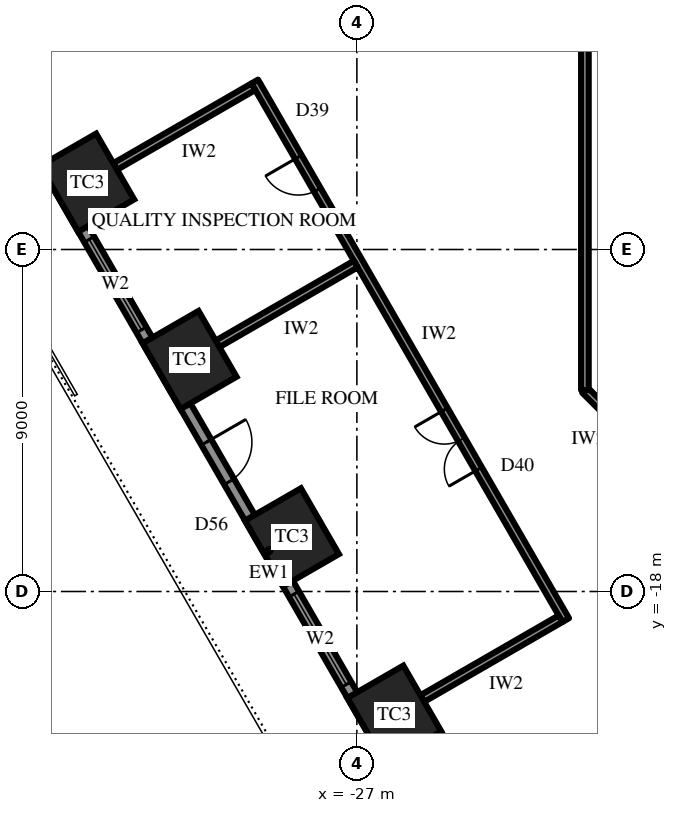
"""IFC4 building model, lengths in metres.
Left out: names, types, materials, properties, quantities, classifications, styles, units other than length and angle.
Written with IfcOpenShell. Run it as: python <this file> out.ifc"""

import sys

from ifc_helpers import new_model, si_unit, direction, frame, frame_2d, origin, origin_2d, place, context, subcontext, project, spatial, rectangle, extrude, element, fill, save


model = new_model("IFC4")
c1 = context("Model", 3, precision=1e-05, world=origin(), true_north=direction((0.0, 1.0)))
c2 = subcontext(c1, "Body", "Model", "MODEL_VIEW")
j1 = project(units=[si_unit("LENGTHUNIT", "METRE"), si_unit("PLANEANGLEUNIT", "RADIAN")], contexts=[c1])
p1 = place(None, origin())
s1 = spatial("IfcSite", under=j1, at=p1, CompositionType="ELEMENT")
p2 = place(p1, origin())
s2 = spatial("IfcBuilding", under=s1, at=p2, CompositionType="ELEMENT")
p3 = place(p2, frame((0.0, 0.0, 65.5)))
s3 = spatial("IfcBuildingStorey", under=s2, at=p3, CompositionType="ELEMENT", Elevation=65.5)
for number, where, z_axis, x_axis in (
    (1, (-34.097, -7.242, 0.0), (0.0, 0.0, 1.0), (0.5, -0.866, 0.0)),
    (2, (-31.403, -11.908, 0.0), (0.0, 0.0, 1.0), (0.5, -0.866, 0.0)),
    (3, (-28.709, -16.575, 0.0), (0.0, 0.0, 1.0), (0.5, -0.866, 0.0)),
    (4, (-26.014, -21.242, 0.0), (0.0, 0.0, 1.0), (0.5, -0.866, 0.0)),
):
    element("IfcColumn", number, at=place(p3, frame(where, z_axis=z_axis, x_axis=x_axis)), inside=s3, PredefinedType="COLUMN", context=c2, shape_type="SweptSolid", body=[
        extrude(rectangle(XDim=2.0, YDim=1.7, at=origin_2d()), origin(), (0.0, 0.0, 1.0), 4.2),
    ])
p4 = place(p3, frame((-37.398, -2.925, 0.0), z_axis=(0.0, 0.0, 1.0), x_axis=(0.499999163675, -0.866025886636, 0.0)))
e5 = element("IfcWall", 5, at=p4, inside=s3, PredefinedType="SOLIDWALL", context=c2, shape_type="SweptSolid", body=[
    extrude(rectangle(XDim=32.332, YDim=0.3, at=frame_2d((16.166, 0.0))), origin(), (0.0, 0.0, 1.0), 2.7),
])
p5 = place(p4, frame((1.319, 0.0, 0.6)))
e6 = element("IfcOpeningElement", 6, at=p5, cuts=e5, PredefinedType="OPENING", context=c2, shape_type="SweptSolid", body=[
    extrude(rectangle(XDim=2.75, YDim=1.85, at=frame_2d((1.375, 0.925))), frame((0.0, 0.16, 0.0), z_axis=(0.0, -1.0, 0.0), x_axis=(1.0, 0.0, 0.0)), (0.0, 0.0, 1.0), 0.32),
])
p6 = place(p4, frame((6.708, 0.0, 0.6)))
e7 = element("IfcOpeningElement", 7, at=p6, cuts=e5, PredefinedType="OPENING", context=c2, shape_type="SweptSolid", body=[
    extrude(rectangle(XDim=2.75, YDim=1.85, at=frame_2d((1.375, 0.925))), frame((0.0, 0.16, 0.0), z_axis=(0.0, -1.0, 0.0), x_axis=(1.0, 0.0, 0.0)), (0.0, 0.0, 1.0), 0.32),
])
p7 = place(p4, frame((12.872, 0.0, 0.0)))
e8 = element("IfcOpeningElement", 8, at=p7, cuts=e5, PredefinedType="OPENING", context=c2, shape_type="SweptSolid", body=[
    extrude(rectangle(XDim=1.2, YDim=2.4, at=frame_2d((0.6, 1.2))), frame((0.0, 0.16, 0.0), z_axis=(0.0, -1.0, 0.0), x_axis=(1.0, 0.0, 0.0)), (0.0, 0.0, 1.0), 0.32),
])
p8 = place(p4, frame((17.485, 0.0, 0.6)))
e9 = element("IfcOpeningElement", 9, at=p8, cuts=e5, PredefinedType="OPENING", context=c2, shape_type="SweptSolid", body=[
    extrude(rectangle(XDim=2.75, YDim=1.85, at=frame_2d((1.375, 0.925))), frame((0.0, 0.16, 0.0), z_axis=(0.0, -1.0, 0.0), x_axis=(1.0, 0.0, 0.0)), (0.0, 0.0, 1.0), 0.32),
])
p9 = place(p4, frame((22.874, 0.0, 0.6)))
e10 = element("IfcOpeningElement", 10, at=p9, cuts=e5, PredefinedType="OPENING", context=c2, shape_type="SweptSolid", body=[
    extrude(rectangle(XDim=2.75, YDim=1.85, at=frame_2d((1.375, 0.925))), frame((0.0, 0.16, 0.0), z_axis=(0.0, -1.0, 0.0), x_axis=(1.0, 0.0, 0.0)), (0.0, 0.0, 1.0), 0.32),
])
p10 = place(p4, frame((28.262, 0.0, 0.6)))
e11 = element("IfcOpeningElement", 11, at=p10, cuts=e5, PredefinedType="OPENING", context=c2, shape_type="SweptSolid", body=[
    extrude(rectangle(XDim=2.75, YDim=1.85, at=frame_2d((1.375, 0.925))), frame((0.0, 0.16, 0.0), z_axis=(0.0, -1.0, 0.0), x_axis=(1.0, 0.0, 0.0)), (0.0, 0.0, 1.0), 0.32),
])
p11 = place(p3, frame((-29.687, -4.58, 0.0), z_axis=(0.0, 0.0, 1.0), x_axis=(0.500000949028, -0.866024855862, 0.0)))
e12 = element("IfcWall", 12, at=p11, inside=s3, PredefinedType="PARTITIONING", context=c2, shape_type="SweptSolid", body=[
    extrude(rectangle(XDim=16.366, YDim=0.2, at=frame_2d((8.183, 0.0))), origin(), (0.0, 0.0, 1.0), 4.0),
])
p12 = place(p11, frame((2.294, 0.0, 0.0)))
e13 = element("IfcOpeningElement", 13, at=p12, cuts=e12, PredefinedType="OPENING", context=c2, shape_type="SweptSolid", body=[
    extrude(rectangle(XDim=1.0, YDim=2.2, at=frame_2d((0.5, 1.1))), frame((0.0, 0.11, 0.0), z_axis=(0.0, -1.0, 0.0), x_axis=(1.0, 0.0, 0.0)), (0.0, 0.0, 1.0), 0.22),
])
p13 = place(p11, frame((9.977, 0.0, 0.0)))
e14 = element("IfcOpeningElement", 14, at=p13, cuts=e12, PredefinedType="OPENING", context=c2, shape_type="SweptSolid", body=[
    extrude(rectangle(XDim=1.8, YDim=2.4, at=frame_2d((0.9, 1.2))), frame((0.0, 0.11, 0.0), z_axis=(0.0, -1.0, 0.0), x_axis=(1.0, 0.0, 0.0)), (0.0, 0.0, 1.0), 0.22),
])
for number, where, z_axis, x_axis in (
    (15, (-29.724, -4.717, 0.0), (0.0, 0.0, 1.0), (-0.866, -0.5, 0.0)),
    (16, (-27.03, -9.383, 0.0), (0.0, 0.0, 1.0), (-0.866, -0.5, 0.0)),
):
    element("IfcWall", number, at=place(p3, frame(where, z_axis=z_axis, x_axis=x_axis)), inside=s3, PredefinedType="PARTITIONING", context=c2, shape_type="SweptSolid", body=[
        extrude(rectangle(XDim=4.2, YDim=0.2, at=frame_2d((2.1, 0.0))), origin(), (0.0, 0.0, 1.0), 2.944),
    ])
p14 = place(p3, frame((-21.641, -18.717, 0.0), z_axis=(0.0, 0.0, 1.0), x_axis=(-0.866009402589, -0.500027713859, 0.0)))
e17 = element("IfcWall", 17, at=p14, inside=s3, PredefinedType="PARTITIONING", context=c2, shape_type="SweptSolid", body=[
    extrude(rectangle(XDim=4.2, YDim=0.2, at=frame_2d((2.1, 0.0))), origin(), (0.0, 0.0, 1.0), 2.992),
])
p15 = place(p3, frame((-19.6, -14.1, 0.0), z_axis=(0.0, 0.0, 1.0), x_axis=(-0.707045124756, 0.707168432242, 0.0)))
e18 = element("IfcWall", 18, at=p15, inside=s3, PredefinedType="PARTITIONING", context=c2, shape_type="SweptSolid", body=[
    extrude(rectangle(XDim=1.98, YDim=0.2, at=frame_2d((0.99, 0.0))), origin(), (0.0, 0.0, 1.0), 4.0),
])
p16 = place(p3, frame((-21.0, -12.7, 0.0), z_axis=(0.0, 0.0, 1.0), x_axis=(0.0, 1.0, 0.0)))
e19 = element("IfcWall", 19, at=p16, inside=s3, PredefinedType="PARTITIONING", context=c2, shape_type="SweptSolid", body=[
    extrude(rectangle(XDim=25.4, YDim=0.2, at=frame_2d((12.7, 0.0))), origin(), (0.0, 0.0, 1.0), 4.0),
])
p17 = place(p16, frame((11.8, 0.0, 0.0)))
e20 = element("IfcOpeningElement", 20, at=p17, cuts=e19, PredefinedType="OPENING", context=c2, shape_type="SweptSolid", body=[
    extrude(rectangle(XDim=1.8, YDim=2.4, at=frame_2d((0.9, 1.2))), frame((0.0, 0.11, 0.0), z_axis=(0.0, -1.0, 0.0), x_axis=(1.0, 0.0, 0.0)), (0.0, 0.0, 1.0), 0.22),
])
p18 = place(p6, origin())
e21 = element("IfcWindow", 21, at=p18, inside=s3, PartitioningType="SINGLE_PANEL", PredefinedType="WINDOW", context=c2, shape_type="SweptSolid", body=[
    extrude(rectangle(XDim=2.75, YDim=1.85, at=frame_2d((1.375, 0.925))), frame((0.0, 0.03, 0.0), z_axis=(0.0, -1.0, 0.0), x_axis=(1.0, 0.0, 0.0)), (0.0, 0.0, 1.0), 0.06),
])
fill(e7, e21)
p19 = place(p7, origin())
e22 = element("IfcDoor", 22, at=p19, inside=s3, OperationType="SINGLE_SWING_RIGHT", PredefinedType="DOOR", context=c2, shape_type="SweptSolid", body=[
    extrude(rectangle(XDim=1.2, YDim=2.4, at=frame_2d((0.6, 1.2))), frame((0.0, 0.025, 0.0), z_axis=(0.0, -1.0, 0.0), x_axis=(1.0, 0.0, 0.0)), (0.0, 0.0, 1.0), 0.05),
])
fill(e8, e22)
p20 = place(p8, origin())
e23 = element("IfcWindow", 23, at=p20, inside=s3, PartitioningType="SINGLE_PANEL", PredefinedType="WINDOW", context=c2, shape_type="SweptSolid", body=[
    extrude(rectangle(XDim=2.75, YDim=1.85, at=frame_2d((1.375, 0.925))), frame((0.0, 0.03, 0.0), z_axis=(0.0, -1.0, 0.0), x_axis=(1.0, 0.0, 0.0)), (0.0, 0.0, 1.0), 0.06),
])
fill(e9, e23)
p21 = place(p12, frame((1.0, 0.0, 0.0), z_axis=(0.0, 0.0, 1.0), x_axis=(-1.0, 0.0, 0.0)))
e24 = element("IfcDoor", 24, at=p21, inside=s3, OperationType="SINGLE_SWING_LEFT", PredefinedType="DOOR", context=c2, shape_type="SweptSolid", body=[
    extrude(rectangle(XDim=1.0, YDim=2.2, at=frame_2d((0.5, 1.1))), frame((0.0, 0.025, 0.0), z_axis=(0.0, -1.0, 0.0), x_axis=(1.0, 0.0, 0.0)), (0.0, 0.0, 1.0), 0.05),
])
fill(e13, e24)
p22 = place(p13, frame((1.8, 0.0, 0.0), z_axis=(0.0, 0.0, 1.0), x_axis=(-1.0, 0.0, 0.0)))
e25 = element("IfcDoor", 25, at=p22, inside=s3, OperationType="DOUBLE_DOOR_SINGLE_SWING", PredefinedType="DOOR", context=c2, shape_type="SweptSolid", body=[
    extrude(rectangle(XDim=1.8, YDim=2.4, at=frame_2d((0.9, 1.2))), frame((0.0, 0.025, 0.0), z_axis=(0.0, -1.0, 0.0), x_axis=(1.0, 0.0, 0.0)), (0.0, 0.0, 1.0), 0.05),
])
fill(e14, e25)
save(model, sys.argv[1])
